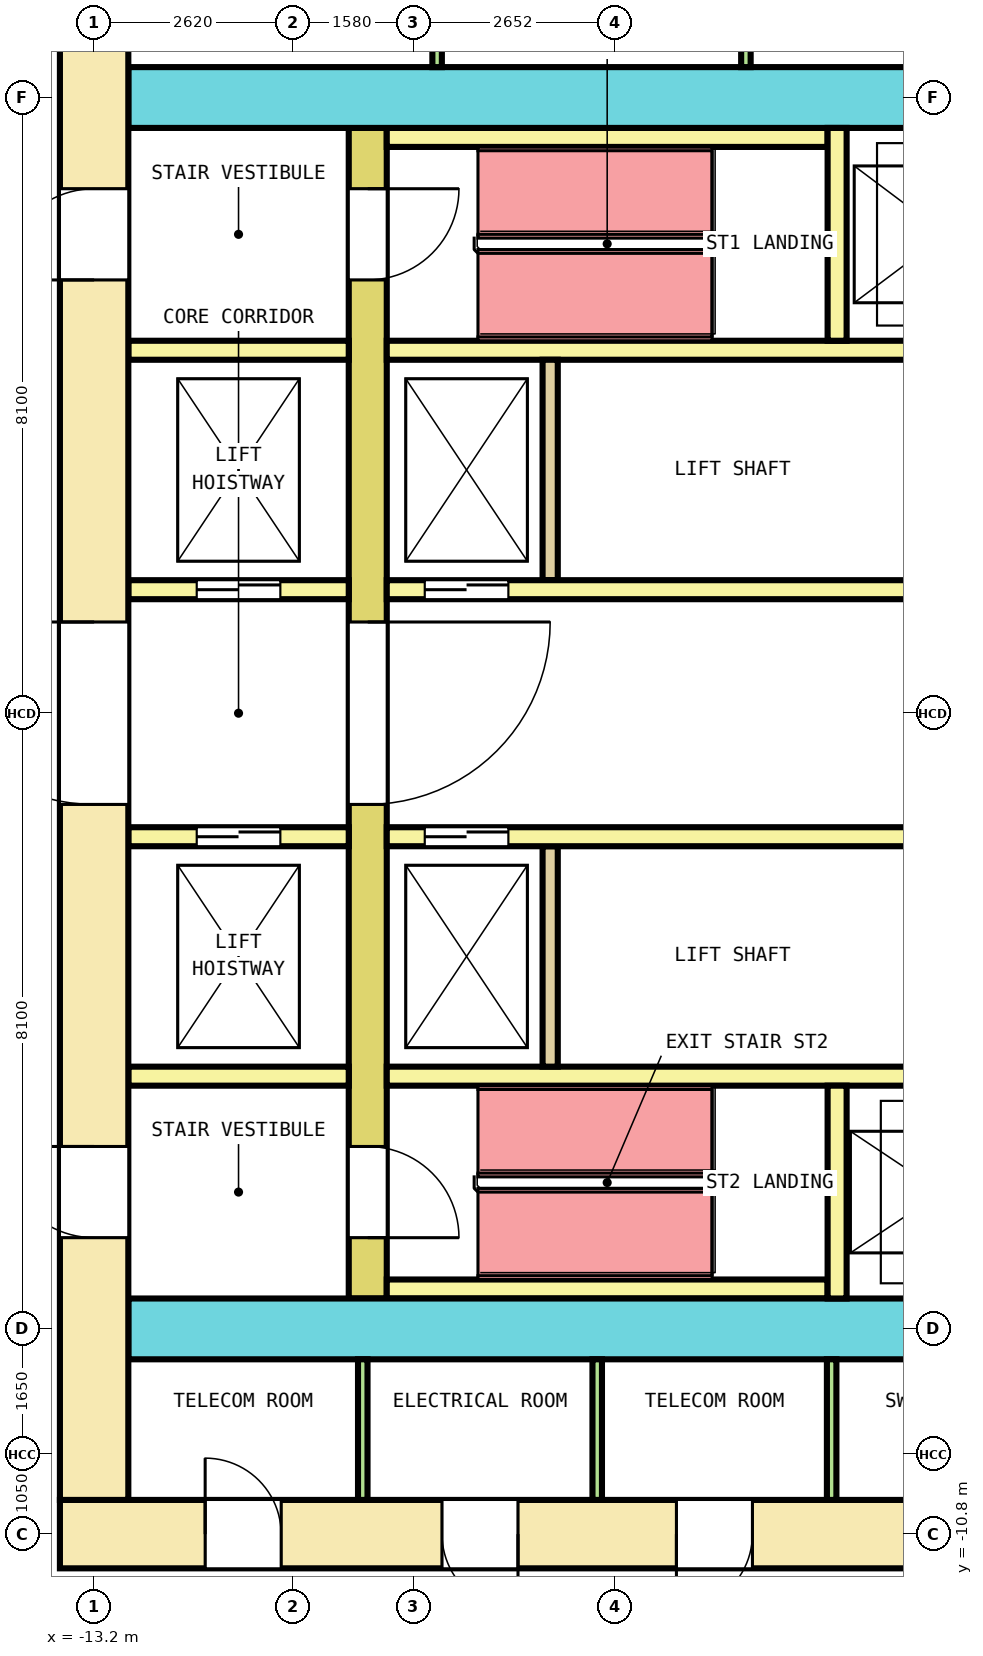
"""IFC4 building model, lengths in metres.
Left out: names, types, materials, properties, quantities, classifications, styles, units other than length and angle.
Written with IfcOpenShell. Run it as: python <this file> out.ifc"""

import sys

from ifc_helpers import new_model, si_unit, direction, frame, frame_2d, origin, place, context, subcontext, project, spatial, rectangle, extrude, element, fill, save


model = new_model("IFC4")
c1 = context("Model", 3, precision=1e-05, world=origin(), true_north=direction((0.0, 1.0)))
c2 = subcontext(c1, "Body", "Model", "MODEL_VIEW")
j1 = project(units=[si_unit("LENGTHUNIT", "METRE"), si_unit("PLANEANGLEUNIT", "RADIAN")], contexts=[c1])
p1 = place(None, origin())
s1 = spatial("IfcSite", under=j1, at=p1, CompositionType="ELEMENT")
p2 = place(p1, origin())
s2 = spatial("IfcBuilding", under=s1, at=p2, CompositionType="ELEMENT")
p3 = place(p2, frame((0.0, 0.0, 45.4)))
s3 = spatial("IfcBuildingStorey", under=s2, at=p3, CompositionType="ELEMENT", Elevation=45.4)
p4 = place(p3, frame((-13.65, -10.8, 0.0), z_axis=(0.0, 0.0, 1.0), x_axis=(1.0, 0.0, 0.0)))
e1 = element("IfcWall", 1, at=p4, inside=s3, PredefinedType="SHEAR", context=c2, shape_type="SweptSolid", body=[
    extrude(rectangle(XDim=27.3, YDim=0.9, at=frame_2d((13.65, 0.0))), origin(), (0.0, 0.0, 1.0), 4.1),
])
p5 = place(p4, frame((1.911, 0.0, 0.0)))
e2 = element("IfcOpeningElement", 2, at=p5, cuts=e1, PredefinedType="OPENING", context=c2, shape_type="SweptSolid", body=[
    extrude(rectangle(XDim=1.0, YDim=2.1, at=frame_2d((0.5, 1.05))), frame((0.0, 0.46, 0.0), z_axis=(0.0, -1.0, 0.0), x_axis=(1.0, 0.0, 0.0)), (0.0, 0.0, 1.0), 0.92),
])
p6 = place(p4, frame((5.027, 0.0, 0.0)))
e3 = element("IfcOpeningElement", 3, at=p6, cuts=e1, PredefinedType="OPENING", context=c2, shape_type="SweptSolid", body=[
    extrude(rectangle(XDim=1.0, YDim=2.1, at=frame_2d((0.5, 1.05))), frame((0.0, 0.46, 0.0), z_axis=(0.0, -1.0, 0.0), x_axis=(1.0, 0.0, 0.0)), (0.0, 0.0, 1.0), 0.92),
])
p7 = place(p4, frame((8.111, 0.0, 0.0)))
e4 = element("IfcOpeningElement", 4, at=p7, cuts=e1, PredefinedType="OPENING", context=c2, shape_type="SweptSolid", body=[
    extrude(rectangle(XDim=1.0, YDim=2.1, at=frame_2d((0.5, 1.05))), frame((0.0, 0.46, 0.0), z_axis=(0.0, -1.0, 0.0), x_axis=(1.0, 0.0, 0.0)), (0.0, 0.0, 1.0), 0.92),
])
p8 = place(p4, frame((11.195, 0.0, 0.0)))
e5 = element("IfcOpeningElement", 5, at=p8, cuts=e1, PredefinedType="OPENING", context=c2, shape_type="SweptSolid", body=[
    extrude(rectangle(XDim=1.0, YDim=2.1, at=frame_2d((0.5, 1.05))), frame((0.0, 0.46, 0.0), z_axis=(0.0, -1.0, 0.0), x_axis=(1.0, 0.0, 0.0)), (0.0, 0.0, 1.0), 0.92),
])
p9 = place(p4, frame((21.913, 0.0, 0.0)))
e6 = element("IfcOpeningElement", 6, at=p9, cuts=e1, PredefinedType="OPENING", context=c2, shape_type="SweptSolid", body=[
    extrude(rectangle(XDim=1.0, YDim=2.1, at=frame_2d((0.5, 1.05))), frame((0.0, 0.46, 0.0), z_axis=(0.0, -1.0, 0.0), x_axis=(1.0, 0.0, 0.0)), (0.0, 0.0, 1.0), 0.92),
])
p10 = place(p4, frame((15.2, 0.0, 0.0)))
e7 = element("IfcOpeningElement", 7, at=p10, cuts=e1, PredefinedType="OPENING", context=c2, shape_type="SweptSolid", body=[
    extrude(rectangle(XDim=1.2, YDim=2.1, at=frame_2d((0.6, 1.05))), frame((0.0, 0.46, 0.0), z_axis=(0.0, -1.0, 0.0), x_axis=(1.0, 0.0, 0.0)), (0.0, 0.0, 1.0), 0.92),
])
p11 = place(p3, frame((-13.2, -10.35, 0.0), z_axis=(0.0, 0.0, 1.0), x_axis=(0.0, 1.0, 0.0)))
e8 = element("IfcWall", 8, at=p11, inside=s3, PredefinedType="SHEAR", context=c2, shape_type="SweptSolid", body=[
    extrude(rectangle(XDim=20.7, YDim=0.9, at=frame_2d((10.35, 0.0))), origin(), (0.0, 0.0, 1.0), 4.1),
])
p12 = place(p11, frame((9.15, 0.0, 0.0)))
e9 = element("IfcOpeningElement", 9, at=p12, cuts=e8, PredefinedType="OPENING", context=c2, shape_type="SweptSolid", body=[
    extrude(rectangle(XDim=2.4, YDim=2.1, at=frame_2d((1.2, 1.05))), frame((0.0, 0.46, 0.0), z_axis=(0.0, -1.0, 0.0), x_axis=(1.0, 0.0, 0.0)), (0.0, 0.0, 1.0), 0.92),
])
p13 = place(p11, frame((16.05, 0.0, 0.0)))
e10 = element("IfcOpeningElement", 10, at=p13, cuts=e8, PredefinedType="OPENING", context=c2, shape_type="SweptSolid", body=[
    extrude(rectangle(XDim=1.2, YDim=2.1, at=frame_2d((0.6, 1.05))), frame((0.0, 0.46, 0.0), z_axis=(0.0, -1.0, 0.0), x_axis=(1.0, 0.0, 0.0)), (0.0, 0.0, 1.0), 0.92),
])
p14 = place(p11, frame((3.45, 0.0, 0.0)))
e11 = element("IfcOpeningElement", 11, at=p14, cuts=e8, PredefinedType="OPENING", context=c2, shape_type="SweptSolid", body=[
    extrude(rectangle(XDim=1.2, YDim=2.1, at=frame_2d((0.6, 1.05))), frame((0.0, 0.46, 0.0), z_axis=(0.0, -1.0, 0.0), x_axis=(1.0, 0.0, 0.0)), (0.0, 0.0, 1.0), 0.92),
])
p15 = place(p3, frame((-12.75, 8.1, 0.0), z_axis=(0.0, 0.0, 1.0), x_axis=(1.0, 0.0, 0.0)))
e12 = element("IfcWall", 12, at=p15, inside=s3, PredefinedType="SHEAR", context=c2, shape_type="SweptSolid", body=[
    extrude(rectangle(XDim=25.5, YDim=0.8, at=frame_2d((12.75, 0.0))), origin(), (0.0, 0.0, 1.0), 4.1),
])
p16 = place(p15, frame((13.675, 0.0, 0.0)))
e13 = element("IfcOpeningElement", 13, at=p16, cuts=e12, PredefinedType="OPENING", context=c2, shape_type="SweptSolid", body=[
    extrude(rectangle(XDim=1.4, YDim=2.1, at=frame_2d((0.7, 1.05))), frame((0.0, 0.41, 0.0), z_axis=(0.0, -1.0, 0.0), x_axis=(1.0, 0.0, 0.0)), (0.0, 0.0, 1.0), 0.82),
])
p17 = place(p3, frame((-12.75, -8.1, 0.0), z_axis=(0.0, 0.0, 1.0), x_axis=(1.0, 0.0, 0.0)))
e14 = element("IfcWall", 14, at=p17, inside=s3, PredefinedType="SHEAR", context=c2, shape_type="SweptSolid", body=[
    extrude(rectangle(XDim=25.5, YDim=0.8, at=frame_2d((12.75, 0.0))), origin(), (0.0, 0.0, 1.0), 4.1),
])
p18 = place(p17, frame((14.3, 0.0, 0.0)))
e15 = element("IfcOpeningElement", 15, at=p18, cuts=e14, PredefinedType="OPENING", context=c2, shape_type="SweptSolid", body=[
    extrude(rectangle(XDim=1.2, YDim=2.1, at=frame_2d((0.6, 1.05))), frame((0.0, 0.41, 0.0), z_axis=(0.0, -1.0, 0.0), x_axis=(1.0, 0.0, 0.0)), (0.0, 0.0, 1.0), 0.82),
])
p19 = place(p3, frame((-9.6, -7.7, 0.0), z_axis=(0.0, 0.0, 1.0), x_axis=(0.0, 1.0, 0.0)))
e16 = element("IfcWall", 16, at=p19, inside=s3, PredefinedType="SHEAR", context=c2, shape_type="SweptSolid", body=[
    extrude(rectangle(XDim=15.4, YDim=0.5, at=frame_2d((7.7, 0.0))), origin(), (0.0, 0.0, 1.0), 4.1),
])
p20 = place(p19, frame((6.5, 0.0, 0.0)))
e17 = element("IfcOpeningElement", 17, at=p20, cuts=e16, PredefinedType="OPENING", context=c2, shape_type="SweptSolid", body=[
    extrude(rectangle(XDim=2.4, YDim=2.1, at=frame_2d((1.2, 1.05))), frame((0.0, 0.26, 0.0), z_axis=(0.0, -1.0, 0.0), x_axis=(1.0, 0.0, 0.0)), (0.0, 0.0, 1.0), 0.52),
])
p21 = place(p19, frame((13.4, 0.0, 0.0)))
e18 = element("IfcOpeningElement", 18, at=p21, cuts=e16, PredefinedType="OPENING", context=c2, shape_type="SweptSolid", body=[
    extrude(rectangle(XDim=1.2, YDim=2.1, at=frame_2d((0.6, 1.05))), frame((0.0, 0.26, 0.0), z_axis=(0.0, -1.0, 0.0), x_axis=(1.0, 0.0, 0.0)), (0.0, 0.0, 1.0), 0.52),
])
p22 = place(p19, frame((0.8, 0.0, 0.0)))
e19 = element("IfcOpeningElement", 19, at=p22, cuts=e16, PredefinedType="OPENING", context=c2, shape_type="SweptSolid", body=[
    extrude(rectangle(XDim=1.2, YDim=2.1, at=frame_2d((0.6, 1.05))), frame((0.0, 0.26, 0.0), z_axis=(0.0, -1.0, 0.0), x_axis=(1.0, 0.0, 0.0)), (0.0, 0.0, 1.0), 0.52),
])
p23 = place(p3, frame((-12.75, 1.625, 0.0), z_axis=(0.0, 0.0, 1.0), x_axis=(1.0, 0.0, 0.0)))
e20 = element("IfcWall", 20, at=p23, inside=s3, PredefinedType="SOLIDWALL", context=c2, shape_type="SweptSolid", body=[
    extrude(rectangle(XDim=2.9, YDim=0.25, at=frame_2d((1.45, 0.0))), origin(), (0.0, 0.0, 1.0), 4.1),
])
p24 = place(p23, frame((0.9, 0.0, 0.0)))
e21 = element("IfcOpeningElement", 21, at=p24, cuts=e20, PredefinedType="OPENING", context=c2, shape_type="SweptSolid", body=[
    extrude(rectangle(XDim=1.1, YDim=2.1, at=frame_2d((0.55, 1.05))), frame((0.0, 0.135, 0.0), z_axis=(0.0, -1.0, 0.0), x_axis=(1.0, 0.0, 0.0)), (0.0, 0.0, 1.0), 0.27),
])
p25 = place(p3, frame((-9.35, 1.625, 0.0), z_axis=(0.0, 0.0, 1.0), x_axis=(1.0, 0.0, 0.0)))
e22 = element("IfcWall", 22, at=p25, inside=s3, PredefinedType="SOLIDWALL", context=c2, shape_type="SweptSolid", body=[
    extrude(rectangle(XDim=18.7, YDim=0.25, at=frame_2d((9.35, 0.0))), origin(), (0.0, 0.0, 1.0), 4.1),
])
p26 = place(p25, frame((0.5, 0.0, 0.0)))
e23 = element("IfcOpeningElement", 23, at=p26, cuts=e22, PredefinedType="OPENING", context=c2, shape_type="SweptSolid", body=[
    extrude(rectangle(XDim=1.1, YDim=2.1, at=frame_2d((0.55, 1.05))), frame((0.0, 0.135, 0.0), z_axis=(0.0, -1.0, 0.0), x_axis=(1.0, 0.0, 0.0)), (0.0, 0.0, 1.0), 0.27),
])
p27 = place(p25, frame((17.1, 0.0, 0.0)))
e24 = element("IfcOpeningElement", 24, at=p27, cuts=e22, PredefinedType="OPENING", context=c2, shape_type="SweptSolid", body=[
    extrude(rectangle(XDim=1.1, YDim=2.1, at=frame_2d((0.55, 1.05))), frame((0.0, 0.135, 0.0), z_axis=(0.0, -1.0, 0.0), x_axis=(1.0, 0.0, 0.0)), (0.0, 0.0, 1.0), 0.27),
])
p28 = place(p3, frame((-12.75, 4.775, 0.0), z_axis=(0.0, 0.0, 1.0), x_axis=(1.0, 0.0, 0.0)))
e25 = element("IfcWall", 25, at=p28, inside=s3, PredefinedType="SOLIDWALL", context=c2, shape_type="SweptSolid", body=[
    extrude(rectangle(XDim=2.9, YDim=0.25, at=frame_2d((1.45, 0.0))), origin(), (0.0, 0.0, 1.0), 4.1),
])
p29 = place(p3, frame((-9.35, 4.775, 0.0), z_axis=(0.0, 0.0, 1.0), x_axis=(1.0, 0.0, 0.0)))
e26 = element("IfcWall", 26, at=p29, inside=s3, PredefinedType="SOLIDWALL", context=c2, shape_type="SweptSolid", body=[
    extrude(rectangle(XDim=18.7, YDim=0.25, at=frame_2d((9.35, 0.0))), origin(), (0.0, 0.0, 1.0), 4.1),
])
p30 = place(p3, frame((-7.2, 1.75, 0.0), z_axis=(0.0, 0.0, 1.0), x_axis=(0.0, 1.0, 0.0)))
e27 = element("IfcWall", 27, at=p30, inside=s3, PredefinedType="SOLIDWALL", context=c2, shape_type="SweptSolid", body=[
    extrude(rectangle(XDim=2.9, YDim=0.2, at=frame_2d((1.45, 0.0))), origin(), (0.0, 0.0, 1.0), 4.1),
])
p31 = place(p3, frame((-12.75, -1.625, 0.0), z_axis=(0.0, 0.0, 1.0), x_axis=(1.0, 0.0, 0.0)))
e28 = element("IfcWall", 28, at=p31, inside=s3, PredefinedType="SOLIDWALL", context=c2, shape_type="SweptSolid", body=[
    extrude(rectangle(XDim=2.9, YDim=0.25, at=frame_2d((1.45, 0.0))), origin(), (0.0, 0.0, 1.0), 4.1),
])
p32 = place(p31, frame((0.9, 0.0, 0.0)))
e29 = element("IfcOpeningElement", 29, at=p32, cuts=e28, PredefinedType="OPENING", context=c2, shape_type="SweptSolid", body=[
    extrude(rectangle(XDim=1.1, YDim=2.1, at=frame_2d((0.55, 1.05))), frame((0.0, 0.135, 0.0), z_axis=(0.0, -1.0, 0.0), x_axis=(1.0, 0.0, 0.0)), (0.0, 0.0, 1.0), 0.27),
])
p33 = place(p3, frame((-9.35, -1.625, 0.0), z_axis=(0.0, 0.0, 1.0), x_axis=(1.0, 0.0, 0.0)))
e30 = element("IfcWall", 30, at=p33, inside=s3, PredefinedType="SOLIDWALL", context=c2, shape_type="SweptSolid", body=[
    extrude(rectangle(XDim=18.7, YDim=0.25, at=frame_2d((9.35, 0.0))), origin(), (0.0, 0.0, 1.0), 4.1),
])
p34 = place(p33, frame((0.5, 0.0, 0.0)))
e31 = element("IfcOpeningElement", 31, at=p34, cuts=e30, PredefinedType="OPENING", context=c2, shape_type="SweptSolid", body=[
    extrude(rectangle(XDim=1.1, YDim=2.1, at=frame_2d((0.55, 1.05))), frame((0.0, 0.135, 0.0), z_axis=(0.0, -1.0, 0.0), x_axis=(1.0, 0.0, 0.0)), (0.0, 0.0, 1.0), 0.27),
])
p35 = place(p33, frame((17.1, 0.0, 0.0)))
e32 = element("IfcOpeningElement", 32, at=p35, cuts=e30, PredefinedType="OPENING", context=c2, shape_type="SweptSolid", body=[
    extrude(rectangle(XDim=1.1, YDim=2.1, at=frame_2d((0.55, 1.05))), frame((0.0, 0.135, 0.0), z_axis=(0.0, -1.0, 0.0), x_axis=(1.0, 0.0, 0.0)), (0.0, 0.0, 1.0), 0.27),
])
p36 = place(p3, frame((-12.75, -4.775, 0.0), z_axis=(0.0, 0.0, 1.0), x_axis=(1.0, 0.0, 0.0)))
e33 = element("IfcWall", 33, at=p36, inside=s3, PredefinedType="SOLIDWALL", context=c2, shape_type="SweptSolid", body=[
    extrude(rectangle(XDim=2.9, YDim=0.25, at=frame_2d((1.45, 0.0))), origin(), (0.0, 0.0, 1.0), 4.1),
])
p37 = place(p3, frame((-9.35, -4.775, 0.0), z_axis=(0.0, 0.0, 1.0), x_axis=(1.0, 0.0, 0.0)))
e34 = element("IfcWall", 34, at=p37, inside=s3, PredefinedType="SOLIDWALL", context=c2, shape_type="SweptSolid", body=[
    extrude(rectangle(XDim=18.7, YDim=0.25, at=frame_2d((9.35, 0.0))), origin(), (0.0, 0.0, 1.0), 4.1),
])
p38 = place(p3, frame((-7.2, -4.65, 0.0), z_axis=(0.0, 0.0, 1.0), x_axis=(0.0, 1.0, 0.0)))
e35 = element("IfcWall", 35, at=p38, inside=s3, PredefinedType="SOLIDWALL", context=c2, shape_type="SweptSolid", body=[
    extrude(rectangle(XDim=2.9, YDim=0.2, at=frame_2d((1.45, 0.0))), origin(), (0.0, 0.0, 1.0), 4.1),
])
p39 = place(p3, frame((-9.35, 7.575, 0.0), z_axis=(0.0, 0.0, 1.0), x_axis=(1.0, 0.0, 0.0)))
e36 = element("IfcWall", 36, at=p39, inside=s3, PredefinedType="SOLIDWALL", context=c2, shape_type="SweptSolid", body=[
    extrude(rectangle(XDim=5.8, YDim=0.25, at=frame_2d((2.9, 0.0))), origin(), (0.0, 0.0, 1.0), 4.1),
])
p40 = place(p3, frame((-3.425, 4.9, 0.0), z_axis=(0.0, 0.0, 1.0), x_axis=(0.0, 1.0, 0.0)))
e37 = element("IfcWall", 37, at=p40, inside=s3, PredefinedType="SOLIDWALL", context=c2, shape_type="SweptSolid", body=[
    extrude(rectangle(XDim=2.8, YDim=0.25, at=frame_2d((1.4, 0.0))), origin(), (0.0, 0.0, 1.0), 4.1),
])
p41 = place(p3, frame((-9.35, -7.575, 0.0), z_axis=(0.0, 0.0, 1.0), x_axis=(1.0, 0.0, 0.0)))
e38 = element("IfcWall", 38, at=p41, inside=s3, PredefinedType="SOLIDWALL", context=c2, shape_type="SweptSolid", body=[
    extrude(rectangle(XDim=5.8, YDim=0.25, at=frame_2d((2.9, 0.0))), origin(), (0.0, 0.0, 1.0), 4.1),
])
p42 = place(p3, frame((-3.425, -7.7, 0.0), z_axis=(0.0, 0.0, 1.0), x_axis=(0.0, 1.0, 0.0)))
e39 = element("IfcWall", 39, at=p42, inside=s3, PredefinedType="SOLIDWALL", context=c2, shape_type="SweptSolid", body=[
    extrude(rectangle(XDim=2.8, YDim=0.25, at=frame_2d((1.4, 0.0))), origin(), (0.0, 0.0, 1.0), 4.1),
])
for number, where, z_axis, x_axis in (
    (40, (-8.688, 8.5, 0.0), (0.0, 0.0, 1.0), (0.0, 1.0, 0.0)),
    (41, (-4.625, 8.5, 0.0), (0.0, 0.0, 1.0), (0.0, 1.0, 0.0)),
    (42, (-9.666, -10.35, 0.0), (0.0, 0.0, 1.0), (0.0, 1.0, 0.0)),
    (43, (-6.581, -10.35, 0.0), (0.0, 0.0, 1.0), (0.0, 1.0, 0.0)),
    (44, (-3.497, -10.35, 0.0), (0.0, 0.0, 1.0), (0.0, 1.0, 0.0)),
):
    element("IfcWall", number, at=place(p3, frame(where, z_axis=z_axis, x_axis=x_axis)), inside=s3, PredefinedType="PARTITIONING", context=c2, shape_type="SweptSolid", body=[
        extrude(rectangle(XDim=1.85, YDim=0.125, at=frame_2d((0.925, 0.0))), origin(), (0.0, 0.0, 1.0), 4.1),
    ])
p43 = place(p24, origin())
e45 = element("IfcDoor", 45, at=p43, inside=s3, OperationType="DOUBLE_DOOR_SLIDING", PredefinedType="DOOR", context=c2, shape_type="SweptSolid", body=[
    extrude(rectangle(XDim=1.1, YDim=2.1, at=frame_2d((0.55, 1.05))), frame((0.0, 0.075, 0.0), z_axis=(0.0, -1.0, 0.0), x_axis=(1.0, 0.0, 0.0)), (0.0, 0.0, 1.0), 0.15),
])
fill(e21, e45)
p44 = place(p26, origin())
e46 = element("IfcDoor", 46, at=p44, inside=s3, OperationType="DOUBLE_DOOR_SLIDING", PredefinedType="DOOR", context=c2, shape_type="SweptSolid", body=[
    extrude(rectangle(XDim=1.1, YDim=2.1, at=frame_2d((0.55, 1.05))), frame((0.0, 0.075, 0.0), z_axis=(0.0, -1.0, 0.0), x_axis=(1.0, 0.0, 0.0)), (0.0, 0.0, 1.0), 0.15),
])
fill(e23, e46)
p45 = place(p32, origin())
e47 = element("IfcDoor", 47, at=p45, inside=s3, OperationType="DOUBLE_DOOR_SLIDING", PredefinedType="DOOR", context=c2, shape_type="SweptSolid", body=[
    extrude(rectangle(XDim=1.1, YDim=2.1, at=frame_2d((0.55, 1.05))), frame((0.0, 0.075, 0.0), z_axis=(0.0, -1.0, 0.0), x_axis=(1.0, 0.0, 0.0)), (0.0, 0.0, 1.0), 0.15),
])
fill(e29, e47)
p46 = place(p34, origin())
e48 = element("IfcDoor", 48, at=p46, inside=s3, OperationType="DOUBLE_DOOR_SLIDING", PredefinedType="DOOR", context=c2, shape_type="SweptSolid", body=[
    extrude(rectangle(XDim=1.1, YDim=2.1, at=frame_2d((0.55, 1.05))), frame((0.0, 0.075, 0.0), z_axis=(0.0, -1.0, 0.0), x_axis=(1.0, 0.0, 0.0)), (0.0, 0.0, 1.0), 0.15),
])
fill(e31, e48)
p47 = place(p20, origin())
e49 = element("IfcDoor", 49, at=p47, inside=s3, OperationType="DOUBLE_DOOR_SINGLE_SWING", PredefinedType="DOOR", context=c2, shape_type="SweptSolid", body=[
    extrude(rectangle(XDim=2.4, YDim=2.1, at=frame_2d((1.2, 1.05))), frame((0.0, 0.2, 0.0), z_axis=(0.0, -1.0, 0.0), x_axis=(1.0, 0.0, 0.0)), (0.0, 0.0, 1.0), 0.4),
])
fill(e17, e49)
p48 = place(p12, origin())
e50 = element("IfcDoor", 50, at=p48, inside=s3, OperationType="DOUBLE_DOOR_SINGLE_SWING", PredefinedType="DOOR", context=c2, shape_type="SweptSolid", body=[
    extrude(rectangle(XDim=2.4, YDim=2.1, at=frame_2d((1.2, 1.05))), frame((0.0, 0.3, 0.0), z_axis=(0.0, -1.0, 0.0), x_axis=(1.0, 0.0, 0.0)), (0.0, 0.0, 1.0), 0.6),
])
fill(e9, e50)
p49 = place(p21, origin())
e51 = element("IfcDoor", 51, at=p49, inside=s3, OperationType="SINGLE_SWING_LEFT", PredefinedType="DOOR", context=c2, shape_type="SweptSolid", body=[
    extrude(rectangle(XDim=1.2, YDim=2.1, at=frame_2d((0.6, 1.05))), frame((0.0, 0.2, 0.0), z_axis=(0.0, -1.0, 0.0), x_axis=(1.0, 0.0, 0.0)), (0.0, 0.0, 1.0), 0.4),
])
fill(e18, e51)
p50 = place(p13, origin())
e52 = element("IfcDoor", 52, at=p50, inside=s3, OperationType="SINGLE_SWING_RIGHT", PredefinedType="DOOR", context=c2, shape_type="SweptSolid", body=[
    extrude(rectangle(XDim=1.2, YDim=2.1, at=frame_2d((0.6, 1.05))), frame((0.0, 0.3, 0.0), z_axis=(0.0, -1.0, 0.0), x_axis=(1.0, 0.0, 0.0)), (0.0, 0.0, 1.0), 0.6),
])
fill(e10, e52)
p51 = place(p22, origin())
e53 = element("IfcDoor", 53, at=p51, inside=s3, OperationType="SINGLE_SWING_LEFT", PredefinedType="DOOR", context=c2, shape_type="SweptSolid", body=[
    extrude(rectangle(XDim=1.2, YDim=2.1, at=frame_2d((0.6, 1.05))), frame((0.0, 0.2, 0.0), z_axis=(0.0, -1.0, 0.0), x_axis=(1.0, 0.0, 0.0)), (0.0, 0.0, 1.0), 0.4),
])
fill(e19, e53)
p52 = place(p14, origin())
e54 = element("IfcDoor", 54, at=p52, inside=s3, OperationType="SINGLE_SWING_RIGHT", PredefinedType="DOOR", context=c2, shape_type="SweptSolid", body=[
    extrude(rectangle(XDim=1.2, YDim=2.1, at=frame_2d((0.6, 1.05))), frame((0.0, 0.3, 0.0), z_axis=(0.0, -1.0, 0.0), x_axis=(1.0, 0.0, 0.0)), (0.0, 0.0, 1.0), 0.6),
])
fill(e11, e54)
p53 = place(p5, origin())
e55 = element("IfcDoor", 55, at=p53, inside=s3, OperationType="SINGLE_SWING_RIGHT", PredefinedType="DOOR", context=c2, shape_type="SweptSolid", body=[
    extrude(rectangle(XDim=1.0, YDim=2.1, at=frame_2d((0.5, 1.05))), frame((0.0, 0.3, 0.0), z_axis=(0.0, -1.0, 0.0), x_axis=(1.0, 0.0, 0.0)), (0.0, 0.0, 1.0), 0.6),
])
fill(e2, e55)
p54 = place(p6, origin())
e56 = element("IfcDoor", 56, at=p54, inside=s3, OperationType="SINGLE_SWING_LEFT", PredefinedType="DOOR", context=c2, shape_type="SweptSolid", body=[
    extrude(rectangle(XDim=1.0, YDim=2.1, at=frame_2d((0.5, 1.05))), frame((0.0, 0.3, 0.0), z_axis=(0.0, -1.0, 0.0), x_axis=(1.0, 0.0, 0.0)), (0.0, 0.0, 1.0), 0.6),
])
fill(e3, e56)
p55 = place(p7, origin())
e57 = element("IfcDoor", 57, at=p55, inside=s3, OperationType="SINGLE_SWING_RIGHT", PredefinedType="DOOR", context=c2, shape_type="SweptSolid", body=[
    extrude(rectangle(XDim=1.0, YDim=2.1, at=frame_2d((0.5, 1.05))), frame((0.0, 0.3, 0.0), z_axis=(0.0, -1.0, 0.0), x_axis=(1.0, 0.0, 0.0)), (0.0, 0.0, 1.0), 0.6),
])
fill(e4, e57)
save(model, sys.argv[1])
